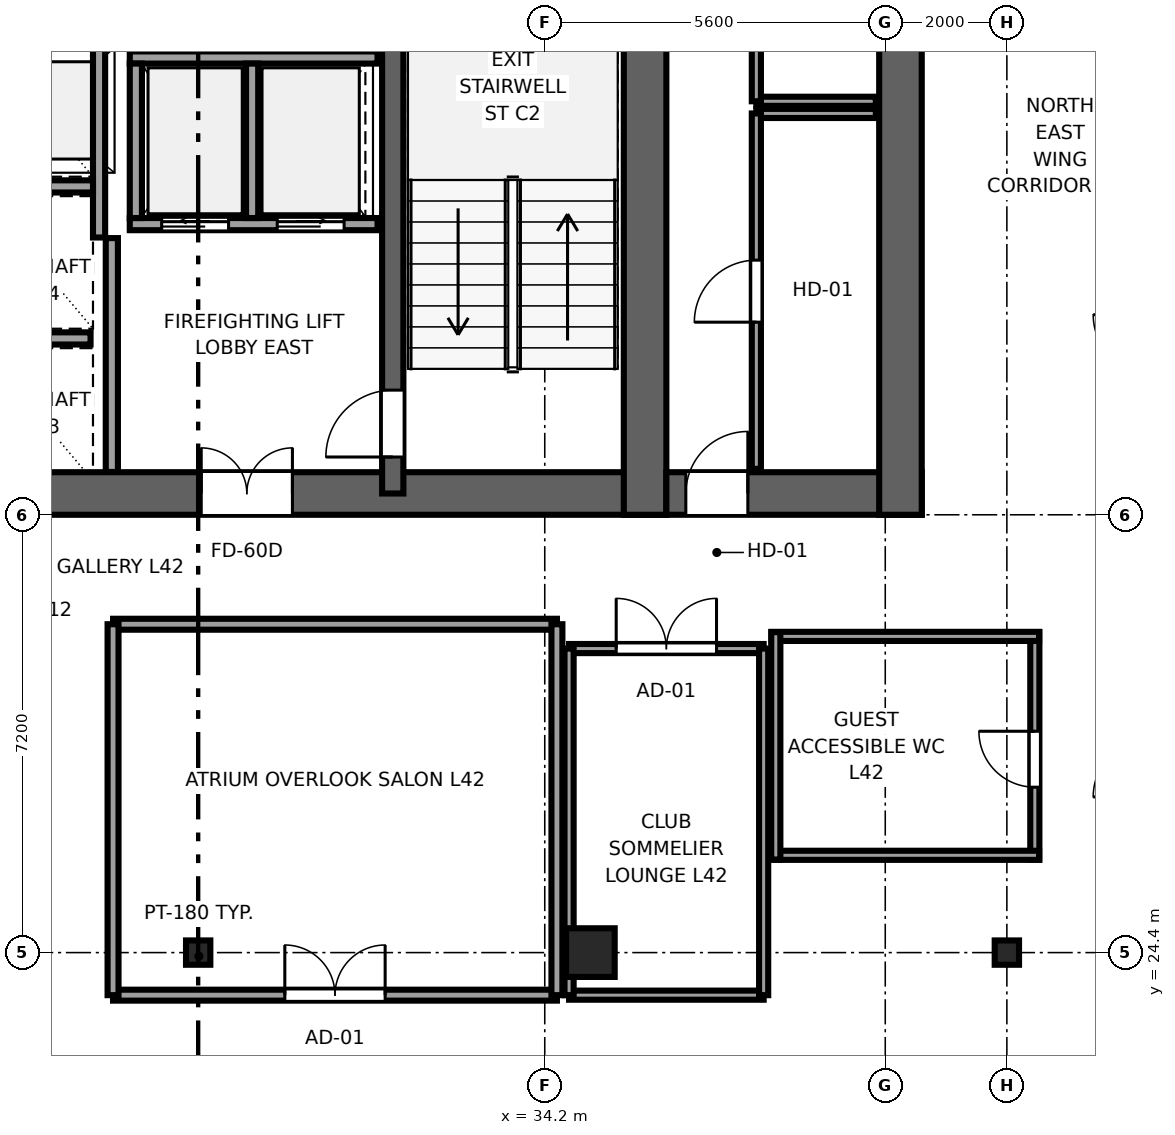
"""IFC4 building model, lengths in metres.
Left out: names, types, materials, properties, quantities, classifications, styles, units other than length and angle.
Written with IfcOpenShell. Run it as: python <this file> out.ifc"""

import sys

from ifc_helpers import new_model, si_unit, direction, frame, frame_2d, origin, origin_2d, place, context, subcontext, project, spatial, rectangle, i_section, extrude, source, transform, mapped, element, fill, save


model = new_model("IFC4")
c1 = context("Model", 3, precision=1e-05, world=origin(), true_north=direction((0.0, 1.0)))
c2 = subcontext(c1, "Body", "Model", "MODEL_VIEW")
j1 = project(units=[si_unit("LENGTHUNIT", "METRE"), si_unit("PLANEANGLEUNIT", "RADIAN")], contexts=[c1])
p1 = place(None, origin())
s1 = spatial("IfcSite", under=j1, at=p1, CompositionType="ELEMENT")
p2 = place(p1, origin())
s2 = spatial("IfcBuilding", under=s1, at=p2, CompositionType="ELEMENT")
p3 = place(p2, frame((0.0, 0.0, 161.25)))
s3 = spatial("IfcBuildingStorey", under=s2, at=p3, CompositionType="ELEMENT", Elevation=161.25)
p4 = place(p3, frame((9.8, 31.95, 0.0), z_axis=(0.0, 0.0, 1.0), x_axis=(1.0, 0.0, 0.0)))
e1 = element("IfcWall", 1, at=p4, inside=s3, PredefinedType="SHEAR", context=c2, shape_type="SweptSolid", body=[
    extrude(rectangle(XDim=26.4, YDim=0.7, at=frame_2d((13.2, 0.0))), origin(), (0.0, 0.0, 1.0), 3.55),
])
p5 = place(p4, frame((7.65, 0.0, 0.0), z_axis=(0.0, 0.0, 1.0), x_axis=(-1.0, 0.0, 0.0)))
e2 = element("IfcOpeningElement", 2, at=p5, cuts=e1, PredefinedType="OPENING", context=c2, shape_type="SweptSolid", body=[
    extrude(rectangle(XDim=1.5, YDim=2.04, at=frame_2d((0.75, 1.02))), frame((0.0, 0.36, 0.0), z_axis=(0.0, -1.0, 0.0), x_axis=(1.0, 0.0, 0.0)), (0.0, 0.0, 1.0), 0.72),
])
p6 = place(p4, frame((13.95, 0.0, 0.0), z_axis=(0.0, 0.0, 1.0), x_axis=(-1.0, 0.0, 0.0)))
e3 = element("IfcOpeningElement", 3, at=p6, cuts=e1, PredefinedType="OPENING", context=c2, shape_type="SweptSolid", body=[
    extrude(rectangle(XDim=1.5, YDim=2.04, at=frame_2d((0.75, 1.02))), frame((0.0, 0.36, 0.0), z_axis=(0.0, -1.0, 0.0), x_axis=(1.0, 0.0, 0.0)), (0.0, 0.0, 1.0), 0.72),
])
p7 = place(p4, frame((20.25, 0.0, 0.0), z_axis=(0.0, 0.0, 1.0), x_axis=(-1.0, 0.0, 0.0)))
e4 = element("IfcOpeningElement", 4, at=p7, cuts=e1, PredefinedType="OPENING", context=c2, shape_type="SweptSolid", body=[
    extrude(rectangle(XDim=1.5, YDim=2.04, at=frame_2d((0.75, 1.02))), frame((0.0, 0.36, 0.0), z_axis=(0.0, -1.0, 0.0), x_axis=(1.0, 0.0, 0.0)), (0.0, 0.0, 1.0), 0.72),
])
p8 = place(p3, frame((35.85, 31.6, 0.0), z_axis=(0.0, 0.0, 1.0), x_axis=(0.0, 1.0, 0.0)))
e5 = element("IfcWall", 5, at=p8, inside=s3, PredefinedType="SHEAR", context=c2, shape_type="SweptSolid", body=[
    extrude(rectangle(XDim=13.6, YDim=0.7, at=frame_2d((6.8, 0.0))), origin(), (0.0, 0.0, 1.0), 3.55),
])
p9 = place(p3, frame((31.7, 31.95, 0.0), z_axis=(0.0, 0.0, 1.0), x_axis=(0.0, 1.0, 0.0)))
e6 = element("IfcWall", 6, at=p9, inside=s3, PredefinedType="SHEAR", context=c2, shape_type="SweptSolid", body=[
    extrude(rectangle(XDim=12.9, YDim=0.35, at=frame_2d((6.45, 0.0))), origin(), (0.0, 0.0, 1.0), 3.55),
])
p10 = place(p9, frame((1.7, 0.0, 0.0), z_axis=(0.0, 0.0, 1.0), x_axis=(-1.0, 0.0, 0.0)))
e7 = element("IfcOpeningElement", 7, at=p10, cuts=e6, PredefinedType="OPENING", context=c2, shape_type="SweptSolid", body=[
    extrude(rectangle(XDim=1.1, YDim=2.12, at=frame_2d((0.55, 1.06))), frame((0.0, 0.185, 0.0), z_axis=(0.0, -1.0, 0.0), x_axis=(1.0, 0.0, 0.0)), (0.0, 0.0, 1.0), 0.37),
])
p11 = place(p3, frame((36.2, 31.95, 0.0), z_axis=(0.0, 0.0, 1.0), x_axis=(1.0, 0.0, 0.0)))
e8 = element("IfcWall", 8, at=p11, inside=s3, PredefinedType="SHEAR", context=c2, shape_type="SweptSolid", body=[
    extrude(rectangle(XDim=4.2, YDim=0.7, at=frame_2d((2.1, 0.0))), origin(), (0.0, 0.0, 1.0), 3.55),
])
p12 = place(p11, frame((1.34, 0.0, 0.0), z_axis=(0.0, 0.0, 1.0), x_axis=(-1.0, 0.0, 0.0)))
e9 = element("IfcOpeningElement", 9, at=p12, cuts=e8, PredefinedType="OPENING", context=c2, shape_type="SweptSolid", body=[
    extrude(rectangle(XDim=1.02, YDim=2.03, at=frame_2d((0.51, 1.015))), frame((0.0, 0.36, 0.0), z_axis=(0.0, -1.0, 0.0), x_axis=(1.0, 0.0, 0.0)), (0.0, 0.0, 1.0), 0.72),
])
p13 = place(p3, frame((40.05, 31.6, 0.0), z_axis=(0.0, 0.0, 1.0), x_axis=(0.0, 1.0, 0.0)))
e10 = element("IfcWall", 10, at=p13, inside=s3, PredefinedType="SHEAR", context=c2, shape_type="SweptSolid", body=[
    extrude(rectangle(XDim=13.6, YDim=0.7, at=frame_2d((6.8, 0.0))), origin(), (0.0, 0.0, 1.0), 3.55),
])
m1 = source(origin(), c2, "Body", "SweptSolid", [
    extrude(rectangle(XDim=0.8, YDim=0.8, at=origin_2d()), origin(), (0.0, 0.0, 1.0), 3.55),
])
p14 = place(p3, frame((34.95, 24.4, 0.0), z_axis=(0.0, 0.0, 1.0), x_axis=(1.0, 0.0, 0.0)))
e11 = element("IfcColumn", 11, at=p14, inside=s3, PredefinedType="COLUMN", context=c2, shape_type="MappedRepresentation", body=[
    mapped(m1, transform((0.0, 0.0, 0.0), x_axis=(1.0, 0.0, 0.0), y_axis=(0.0, 1.0, 0.0), z_axis=(0.0, 0.0, 1.0), scale=1.0)),
])
m2 = source(origin(), c2, "Body", "SweptSolid", [
    extrude(i_section(OverallWidth=0.4, OverallDepth=0.4, WebThickness=0.02, FlangeThickness=0.035, at=origin_2d()), origin(), (0.0, 0.0, 1.0), 3.55),
])
for number, where, z_axis, x_axis in (
    (12, (41.8, 24.4, 0.0), (0.0, 0.0, 1.0), (1.0, 0.0, 0.0)),
    (13, (28.5, 24.4, 0.0), (0.0, 0.0, 1.0), (1.0, 0.0, 0.0)),
):
    element("IfcColumn", number, at=place(p3, frame(where, z_axis=z_axis, x_axis=x_axis)), inside=s3, PredefinedType="COLUMN", context=c2, shape_type="MappedRepresentation", body=[
        mapped(m2, transform((0.0, 0.0, 0.0), x_axis=(1.0, 0.0, 0.0), y_axis=(0.0, 1.0, 0.0), z_axis=(0.0, 0.0, 1.0), scale=1.0)),
    ])
p15 = place(p3, frame((27.08, 32.304, 0.0), z_axis=(0.0, 0.0, 1.0), x_axis=(0.0, 1.0, 0.0)))
e14 = element("IfcWall", 14, at=p15, inside=s3, PredefinedType="SOLIDWALL", context=c2, shape_type="SweptSolid", body=[
    extrude(rectangle(XDim=3.846, YDim=0.2, at=frame_2d((1.923, 0.0))), origin(), (0.0, 0.0, 1.0), 3.37),
])
p16 = place(p3, frame((27.375, 36.38, 0.0), z_axis=(0.0, 0.0, 1.0), x_axis=(1.0, 0.0, 0.0)))
e15 = element("IfcWall", 15, at=p16, inside=s3, PredefinedType="SOLIDWALL", context=c2, shape_type="SweptSolid", body=[
    extrude(rectangle(XDim=4.075, YDim=0.2, at=frame_2d((2.038, 0.0))), origin(), (0.0, 0.0, 1.0), 3.37),
])
p17 = place(p16, frame((0.525, 0.0, 0.0)))
e16 = element("IfcOpeningElement", 16, at=p17, cuts=e15, PredefinedType="OPENING", context=c2, shape_type="SweptSolid", body=[
    extrude(rectangle(XDim=1.1, YDim=2.12, at=frame_2d((0.55, 1.06))), frame((0.0, 0.11, 0.0), z_axis=(0.0, -1.0, 0.0), x_axis=(1.0, 0.0, 0.0)), (0.0, 0.0, 1.0), 0.22),
])
p18 = place(p16, frame((2.425, 0.0, 0.0)))
e17 = element("IfcOpeningElement", 17, at=p18, cuts=e15, PredefinedType="OPENING", context=c2, shape_type="SweptSolid", body=[
    extrude(rectangle(XDim=1.1, YDim=2.12, at=frame_2d((0.55, 1.06))), frame((0.0, 0.11, 0.0), z_axis=(0.0, -1.0, 0.0), x_axis=(1.0, 0.0, 0.0)), (0.0, 0.0, 1.0), 0.22),
])
p19 = place(p3, frame((27.375, 39.12, 0.0), z_axis=(0.0, 0.0, 1.0), x_axis=(1.0, 0.0, 0.0)))
e18 = element("IfcWall", 18, at=p19, inside=s3, PredefinedType="SOLIDWALL", context=c2, shape_type="SweptSolid", body=[
    extrude(rectangle(XDim=4.075, YDim=0.2, at=frame_2d((2.038, 0.0))), origin(), (0.0, 0.0, 1.0), 3.37),
])
for number, where, z_axis, x_axis in (
    (19, (27.475, 36.48, 0.0), (0.0, 0.0, 1.0), (0.0, 1.0, 0.0)),
    (20, (29.387, 36.48, 0.0), (0.0, 0.0, 1.0), (0.0, 1.0, 0.0)),
):
    element("IfcWall", number, at=place(p3, frame(where, z_axis=z_axis, x_axis=x_axis)), inside=s3, PredefinedType="SOLIDWALL", context=c2, shape_type="SweptSolid", body=[
        extrude(rectangle(XDim=2.54, YDim=0.2, at=frame_2d((1.27, 0.0))), origin(), (0.0, 0.0, 1.0), 3.37),
    ])
p20 = place(p3, frame((26.87, 36.16, 0.0), z_axis=(0.0, 0.0, 1.0), x_axis=(0.0, 1.0, 0.0)))
e21 = element("IfcWall", 21, at=p20, inside=s3, PredefinedType="SOLIDWALL", context=c2, shape_type="SweptSolid", body=[
    extrude(rectangle(XDim=8.336, YDim=0.2, at=frame_2d((4.168, 0.0))), origin(), (0.0, 0.0, 1.0), 3.37),
])
p21 = place(p3, frame((24.93, 34.5, 0.0), z_axis=(0.0, 0.0, 1.0), x_axis=(1.0, 0.0, 0.0)))
e22 = element("IfcWall", 22, at=p21, inside=s3, PredefinedType="SOLIDWALL", context=c2, shape_type="SweptSolid", body=[
    extrude(rectangle(XDim=1.8, YDim=0.2, at=frame_2d((0.9, 0.0))), origin(), (0.0, 0.0, 1.0), 3.37),
])
p22 = place(p3, frame((24.93, 37.0, 0.0), z_axis=(0.0, 0.0, 1.0), x_axis=(1.0, 0.0, 0.0)))
e23 = element("IfcWall", 23, at=p22, inside=s3, PredefinedType="SOLIDWALL", context=c2, shape_type="SweptSolid", body=[
    extrude(rectangle(XDim=1.84, YDim=0.2, at=frame_2d((0.92, 0.0))), origin(), (0.0, 0.0, 1.0), 3.37),
])
p23 = place(p3, frame((37.68, 38.2, 0.0), z_axis=(0.0, 0.0, 1.0), x_axis=(1.0, 0.0, 0.0)))
e24 = element("IfcWall", 24, at=p23, inside=s3, PredefinedType="PARTITIONING", context=c2, shape_type="SweptSolid", body=[
    extrude(rectangle(XDim=1.965, YDim=0.15, at=frame_2d((0.982, 0.0))), origin(), (0.0, 0.0, 1.0), 3.37),
])
p24 = place(p3, frame((37.68, 32.355, 0.0), z_axis=(0.0, 0.0, 1.0), x_axis=(0.0, 1.0, 0.0)))
e25 = element("IfcWall", 25, at=p24, inside=s3, PredefinedType="PARTITIONING", context=c2, shape_type="SweptSolid", body=[
    extrude(rectangle(XDim=5.845, YDim=0.15, at=frame_2d((2.922, 0.0))), origin(), (0.0, 0.0, 1.0), 3.37),
])
p25 = place(p24, frame((2.413, 0.0, 0.0)))
e26 = element("IfcOpeningElement", 26, at=p25, cuts=e25, PredefinedType="OPENING", context=c2, shape_type="SweptSolid", body=[
    extrude(rectangle(XDim=1.02, YDim=2.03, at=frame_2d((0.51, 1.015))), frame((0.0, 0.085, 0.0), z_axis=(0.0, -1.0, 0.0), x_axis=(1.0, 0.0, 0.0)), (0.0, 0.0, 1.0), 0.17),
])
p26 = place(p3, frame((37.68, 38.4, 0.0), z_axis=(0.0, 0.0, 1.0), x_axis=(1.0, 0.0, 0.0)))
e27 = element("IfcWall", 27, at=p26, inside=s3, PredefinedType="PARTITIONING", context=c2, shape_type="SweptSolid", body=[
    extrude(rectangle(XDim=1.965, YDim=0.15, at=frame_2d((0.982, 0.0))), origin(), (0.0, 0.0, 1.0), 3.37),
])
p27 = place(p3, frame((37.68, 38.4, 0.0), z_axis=(0.0, 0.0, 1.0), x_axis=(0.0, 1.0, 0.0)))
e28 = element("IfcWall", 28, at=p27, inside=s3, PredefinedType="PARTITIONING", context=c2, shape_type="SweptSolid", body=[
    extrude(rectangle(XDim=5.8, YDim=0.15, at=frame_2d((2.9, 0.0))), origin(), (0.0, 0.0, 1.0), 3.37),
])
p28 = place(p27, frame((2.49, 0.0, 0.0)))
e29 = element("IfcOpeningElement", 29, at=p28, cuts=e28, PredefinedType="OPENING", context=c2, shape_type="SweptSolid", body=[
    extrude(rectangle(XDim=0.82, YDim=2.01, at=frame_2d((0.41, 1.005))), frame((0.0, 0.085, 0.0), z_axis=(0.0, -1.0, 0.0), x_axis=(1.0, 0.0, 0.0)), (0.0, 0.0, 1.0), 0.17),
])
p29 = place(p3, frame((42.26, 25.93, 0.0), z_axis=(0.0, 0.0, 1.0), x_axis=(0.0, 1.0, 0.0)))
e30 = element("IfcWall", 30, at=p29, inside=s3, PredefinedType="PARTITIONING", context=c2, shape_type="SweptSolid", body=[
    extrude(rectangle(XDim=3.74, YDim=0.15, at=frame_2d((1.87, 0.0))), origin(), (0.0, 0.0, 1.0), 3.37),
])
p30 = place(p29, frame((1.19, 0.0, 0.0)))
e31 = element("IfcOpeningElement", 31, at=p30, cuts=e30, PredefinedType="OPENING", context=c2, shape_type="SweptSolid", body=[
    extrude(rectangle(XDim=0.92, YDim=2.01, at=frame_2d((0.46, 1.005))), frame((0.0, 0.085, 0.0), z_axis=(0.0, -1.0, 0.0), x_axis=(1.0, 0.0, 0.0)), (0.0, 0.0, 1.0), 0.17),
])
for number, where, z_axis, x_axis in (
    (32, (37.93, 26.0, 0.0), (0.0, 0.0, 1.0), (1.0, 0.0, 0.0)),
    (33, (37.93, 29.6, 0.0), (0.0, 0.0, 1.0), (1.0, 0.0, 0.0)),
):
    element("IfcWall", number, at=place(p3, frame(where, z_axis=z_axis, x_axis=x_axis)), inside=s3, PredefinedType="PARTITIONING", context=c2, shape_type="SweptSolid", body=[
        extrude(rectangle(XDim=4.4, YDim=0.15, at=frame_2d((2.2, 0.0))), origin(), (0.0, 0.0, 1.0), 3.37),
    ])
p31 = place(p3, frame((38.0, 25.93, 0.0), z_axis=(0.0, 0.0, 1.0), x_axis=(0.0, 1.0, 0.0)))
e34 = element("IfcWall", 34, at=p31, inside=s3, PredefinedType="PARTITIONING", context=c2, shape_type="SweptSolid", body=[
    extrude(rectangle(XDim=3.74, YDim=0.15, at=frame_2d((1.87, 0.0))), origin(), (0.0, 0.0, 1.0), 3.37),
])
p32 = place(p3, frame((27.1, 23.7, 0.0), z_axis=(0.0, 0.0, 1.0), x_axis=(1.0, 0.0, 0.0)))
e35 = element("IfcWall", 35, at=p32, inside=s3, PredefinedType="PARTITIONING", context=c2, shape_type="SweptSolid", body=[
    extrude(rectangle(XDim=7.3, YDim=0.18, at=frame_2d((3.65, 0.0))), origin(), (0.0, 0.0, 1.0), 3.37),
])
p33 = place(p32, frame((2.825, 0.0, 0.0)))
e36 = element("IfcOpeningElement", 36, at=p33, cuts=e35, PredefinedType="OPENING", context=c2, shape_type="SweptSolid", body=[
    extrude(rectangle(XDim=1.65, YDim=2.15, at=frame_2d((0.825, 1.075))), frame((0.0, 0.1, 0.0), z_axis=(0.0, -1.0, 0.0), x_axis=(1.0, 0.0, 0.0)), (0.0, 0.0, 1.0), 0.2),
])
p34 = place(p3, frame((27.1, 29.8, 0.0), z_axis=(0.0, 0.0, 1.0), x_axis=(1.0, 0.0, 0.0)))
e37 = element("IfcWall", 37, at=p34, inside=s3, PredefinedType="PARTITIONING", context=c2, shape_type="SweptSolid", body=[
    extrude(rectangle(XDim=7.3, YDim=0.18, at=frame_2d((3.65, 0.0))), origin(), (0.0, 0.0, 1.0), 3.37),
])
for number, where, z_axis, x_axis in (
    (38, (27.1, 23.7, 0.0), (0.0, 0.0, 1.0), (0.0, 1.0, 0.0)),
    (39, (34.4, 23.7, 0.0), (0.0, 0.0, 1.0), (0.0, 1.0, 0.0)),
):
    element("IfcWall", number, at=place(p3, frame(where, z_axis=z_axis, x_axis=x_axis)), inside=s3, PredefinedType="PARTITIONING", context=c2, shape_type="SweptSolid", body=[
        extrude(rectangle(XDim=6.1, YDim=0.18, at=frame_2d((3.05, 0.0))), origin(), (0.0, 0.0, 1.0), 3.37),
    ])
p35 = place(p3, frame((34.6, 23.7, 0.0), z_axis=(0.0, 0.0, 1.0), x_axis=(1.0, 0.0, 0.0)))
e40 = element("IfcWall", 40, at=p35, inside=s3, PredefinedType="PARTITIONING", context=c2, shape_type="SweptSolid", body=[
    extrude(rectangle(XDim=3.2, YDim=0.15, at=frame_2d((1.6, 0.0))), origin(), (0.0, 0.0, 1.0), 3.37),
])
p36 = place(p3, frame((34.6, 29.4, 0.0), z_axis=(0.0, 0.0, 1.0), x_axis=(1.0, 0.0, 0.0)))
e41 = element("IfcWall", 41, at=p36, inside=s3, PredefinedType="PARTITIONING", context=c2, shape_type="SweptSolid", body=[
    extrude(rectangle(XDim=3.2, YDim=0.15, at=frame_2d((1.6, 0.0))), origin(), (0.0, 0.0, 1.0), 3.37),
])
p37 = place(p36, frame((0.775, 0.0, 0.0)))
e42 = element("IfcOpeningElement", 42, at=p37, cuts=e41, PredefinedType="OPENING", context=c2, shape_type="SweptSolid", body=[
    extrude(rectangle(XDim=1.65, YDim=2.15, at=frame_2d((0.825, 1.075))), frame((0.0, 0.085, 0.0), z_axis=(0.0, -1.0, 0.0), x_axis=(1.0, 0.0, 0.0)), (0.0, 0.0, 1.0), 0.17),
])
for number, where, z_axis, x_axis in (
    (43, (34.6, 23.7, 0.0), (0.0, 0.0, 1.0), (0.0, 1.0, 0.0)),
    (44, (37.8, 23.7, 0.0), (0.0, 0.0, 1.0), (0.0, 1.0, 0.0)),
):
    element("IfcWall", number, at=place(p3, frame(where, z_axis=z_axis, x_axis=x_axis)), inside=s3, PredefinedType="PARTITIONING", context=c2, shape_type="SweptSolid", body=[
        extrude(rectangle(XDim=5.7, YDim=0.15, at=frame_2d((2.85, 0.0))), origin(), (0.0, 0.0, 1.0), 3.37),
    ])
m3 = source(origin(), c2, "Body", "SweptSolid", [
    extrude(rectangle(XDim=1.1, YDim=2.12, at=frame_2d((0.55, 1.06))), frame((0.0, 0.025, 0.0), z_axis=(0.0, -1.0, 0.0), x_axis=(1.0, 0.0, 0.0)), (0.0, 0.0, 1.0), 0.05),
])
p38 = place(p10, origin())
e45 = element("IfcDoor", 45, at=p38, inside=s3, OperationType="SINGLE_SWING_LEFT", PredefinedType="DOOR", context=c2, shape_type="MappedRepresentation", body=[
    mapped(m3, transform((0.0, 0.0, 0.0), x_axis=(1.0, 0.0, 0.0), y_axis=(0.0, 1.0, 0.0), z_axis=(0.0, 0.0, 1.0), scale=1.0)),
])
fill(e7, e45)
m4 = source(origin(), c2, "Body", "SweptSolid", [
    extrude(rectangle(XDim=1.5, YDim=2.04, at=frame_2d((0.75, 1.02))), frame((0.0, 0.025, 0.0), z_axis=(0.0, -1.0, 0.0), x_axis=(1.0, 0.0, 0.0)), (0.0, 0.0, 1.0), 0.05),
])
p39 = place(p7, origin())
e46 = element("IfcDoor", 46, at=p39, inside=s3, OperationType="DOUBLE_DOOR_SINGLE_SWING", PredefinedType="DOOR", context=c2, shape_type="MappedRepresentation", body=[
    mapped(m4, transform((0.0, 0.0, 0.0), x_axis=(1.0, 0.0, 0.0), y_axis=(0.0, 1.0, 0.0), z_axis=(0.0, 0.0, 1.0), scale=1.0)),
])
fill(e4, e46)
m5 = source(origin(), c2, "Body", "SweptSolid", [
    extrude(rectangle(XDim=1.02, YDim=2.03, at=frame_2d((0.51, 1.015))), frame((0.0, 0.025, 0.0), z_axis=(0.0, -1.0, 0.0), x_axis=(1.0, 0.0, 0.0)), (0.0, 0.0, 1.0), 0.05),
])
p40 = place(p12, origin())
e47 = element("IfcDoor", 47, at=p40, inside=s3, OperationType="SINGLE_SWING_RIGHT", PredefinedType="DOOR", context=c2, shape_type="MappedRepresentation", body=[
    mapped(m5, transform((0.0, 0.0, 0.0), x_axis=(1.0, 0.0, 0.0), y_axis=(0.0, 1.0, 0.0), z_axis=(0.0, 0.0, 1.0), scale=1.0)),
])
fill(e9, e47)
m6 = source(origin(), c2, "Body", "SweptSolid", [
    extrude(rectangle(XDim=1.1, YDim=2.12, at=frame_2d((0.55, 1.06))), frame((0.0, 0.025, 0.0), z_axis=(0.0, -1.0, 0.0), x_axis=(1.0, 0.0, 0.0)), (0.0, 0.0, 1.0), 0.05),
])
p41 = place(p17, origin())
e48 = element("IfcDoor", 48, at=p41, inside=s3, OperationType="SLIDING_TO_LEFT", PredefinedType="DOOR", context=c2, shape_type="MappedRepresentation", body=[
    mapped(m6, transform((0.0, 0.0, 0.0), x_axis=(1.0, 0.0, 0.0), y_axis=(0.0, 1.0, 0.0), z_axis=(0.0, 0.0, 1.0), scale=1.0)),
])
fill(e16, e48)
p42 = place(p18, origin())
e49 = element("IfcDoor", 49, at=p42, inside=s3, OperationType="SLIDING_TO_RIGHT", PredefinedType="DOOR", context=c2, shape_type="MappedRepresentation", body=[
    mapped(m6, transform((0.0, 0.0, 0.0), x_axis=(1.0, 0.0, 0.0), y_axis=(0.0, 1.0, 0.0), z_axis=(0.0, 0.0, 1.0), scale=1.0)),
])
fill(e17, e49)
p43 = place(p25, origin())
e50 = element("IfcDoor", 50, at=p43, inside=s3, OperationType="SINGLE_SWING_LEFT", PredefinedType="DOOR", context=c2, shape_type="MappedRepresentation", body=[
    mapped(m5, transform((0.0, 0.0, 0.0), x_axis=(1.0, 0.0, 0.0), y_axis=(0.0, 1.0, 0.0), z_axis=(0.0, 0.0, 1.0), scale=1.0)),
])
fill(e26, e50)
m7 = source(origin(), c2, "Body", "SweptSolid", [
    extrude(rectangle(XDim=0.92, YDim=2.01, at=frame_2d((0.46, 1.005))), frame((0.0, 0.025, 0.0), z_axis=(0.0, -1.0, 0.0), x_axis=(1.0, 0.0, 0.0)), (0.0, 0.0, 1.0), 0.05),
])
p44 = place(p30, origin())
e51 = element("IfcDoor", 51, at=p44, inside=s3, OperationType="SINGLE_SWING_RIGHT", PredefinedType="DOOR", context=c2, shape_type="MappedRepresentation", body=[
    mapped(m7, transform((0.0, 0.0, 0.0), x_axis=(1.0, 0.0, 0.0), y_axis=(0.0, 1.0, 0.0), z_axis=(0.0, 0.0, 1.0), scale=1.0)),
])
fill(e31, e51)
m8 = source(origin(), c2, "Body", "SweptSolid", [
    extrude(rectangle(XDim=1.65, YDim=2.15, at=frame_2d((0.825, 1.075))), frame((0.0, 0.025, 0.0), z_axis=(0.0, -1.0, 0.0), x_axis=(1.0, 0.0, 0.0)), (0.0, 0.0, 1.0), 0.05),
])
p45 = place(p33, origin())
e52 = element("IfcDoor", 52, at=p45, inside=s3, OperationType="DOUBLE_DOOR_SINGLE_SWING", PredefinedType="DOOR", context=c2, shape_type="MappedRepresentation", body=[
    mapped(m8, transform((0.0, 0.0, 0.0), x_axis=(1.0, 0.0, 0.0), y_axis=(0.0, 1.0, 0.0), z_axis=(0.0, 0.0, 1.0), scale=1.0)),
])
fill(e36, e52)
p46 = place(p37, origin())
e53 = element("IfcDoor", 53, at=p46, inside=s3, OperationType="DOUBLE_DOOR_SINGLE_SWING", PredefinedType="DOOR", context=c2, shape_type="MappedRepresentation", body=[
    mapped(m8, transform((0.0, 0.0, 0.0), x_axis=(1.0, 0.0, 0.0), y_axis=(0.0, 1.0, 0.0), z_axis=(0.0, 0.0, 1.0), scale=1.0)),
])
fill(e42, e53)
save(model, sys.argv[1])
